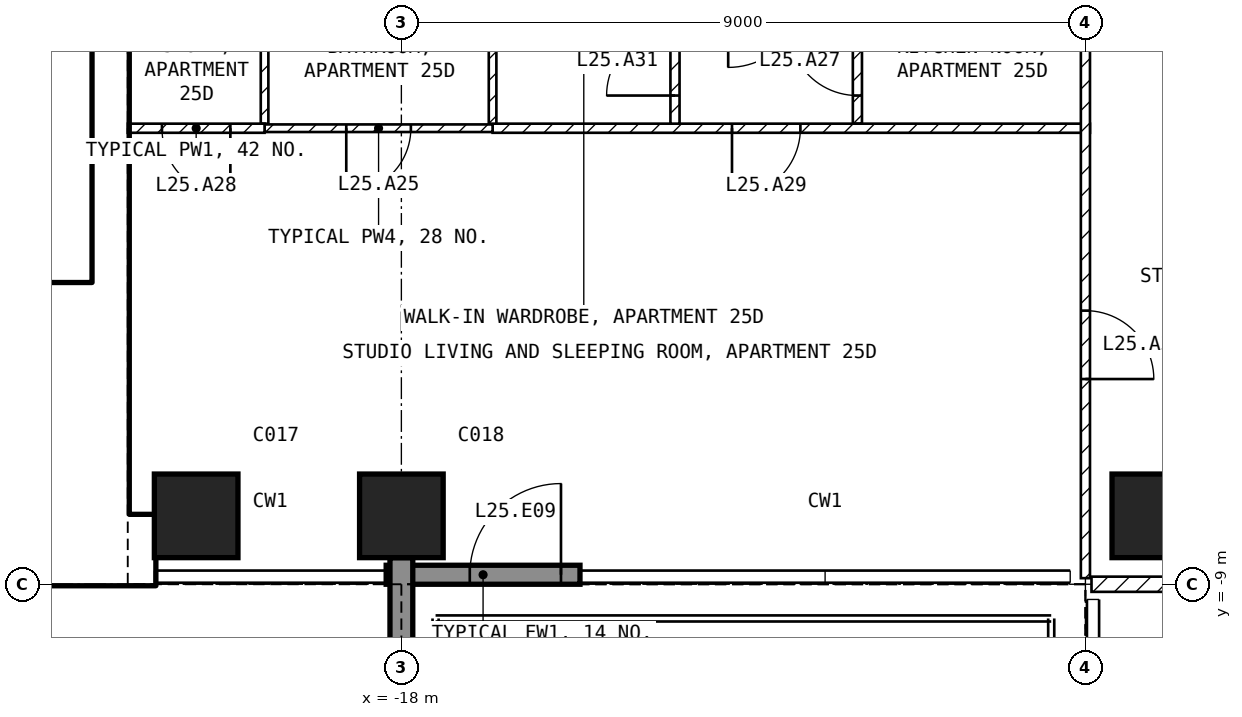
"""IFC4 building model, lengths in metres.
Left out: names, types, materials, properties, quantities, classifications, styles, units other than length and angle.
Written with IfcOpenShell. Run it as: python <this file> out.ifc"""

import sys

from ifc_helpers import new_model, si_unit, direction, frame, frame_2d, origin, origin_2d, place, context, subcontext, project, spatial, rectangle, extrude, element, fill, save


model = new_model("IFC4")
c1 = context("Model", 3, precision=1e-05, world=origin(), true_north=direction((0.0, 1.0)))
c2 = subcontext(c1, "Body", "Model", "MODEL_VIEW")
j1 = project(units=[si_unit("LENGTHUNIT", "METRE"), si_unit("PLANEANGLEUNIT", "RADIAN")], contexts=[c1])
p1 = place(None, origin())
s1 = spatial("IfcSite", under=j1, at=p1, CompositionType="ELEMENT")
p2 = place(p1, origin())
s2 = spatial("IfcBuilding", under=s1, at=p2, CompositionType="ELEMENT")
p3 = place(p2, frame((0.0, 0.0, 109.4)))
s3 = spatial("IfcBuildingStorey", under=s2, at=p3, CompositionType="ELEMENT", Elevation=109.4)
for number, where, z_axis, x_axis in (
    (1, (-20.7, -8.1, -0.25), (0.0, 0.0, 1.0), (1.0, 0.0, 0.0)),
    (2, (-18.0, -8.1, -0.25), (0.0, 0.0, 1.0), (1.0, 0.0, 0.0)),
    (3, (-8.1, -8.1, -0.25), (0.0, 0.0, 1.0), (1.0, 0.0, 0.0)),
):
    element("IfcColumn", number, at=place(p3, frame(where, z_axis=z_axis, x_axis=x_axis)), inside=s3, PredefinedType="COLUMN", context=c2, shape_type="SweptSolid", body=[
        extrude(rectangle(XDim=1.1, YDim=1.1, at=origin_2d()), origin(), (0.0, 0.0, 1.0), 3.5),
    ])
p4 = place(p3, frame((-18.2, -8.875, 0.0), z_axis=(0.0, 0.0, 1.0), x_axis=(1.0, 0.0, 0.0)))
e4 = element("IfcWall", 4, at=p4, inside=s3, PredefinedType="SOLIDWALL", context=c2, shape_type="SweptSolid", body=[
    extrude(rectangle(XDim=2.55, YDim=0.25, at=frame_2d((1.275, 0.0))), origin(), (0.0, 0.0, 1.0), 3.25),
])
p5 = place(p4, frame((1.1, 0.0, 0.0)))
e5 = element("IfcOpeningElement", 5, at=p5, cuts=e4, PredefinedType="OPENING", context=c2, shape_type="SweptSolid", body=[
    extrude(rectangle(XDim=1.2, YDim=2.4, at=frame_2d((0.6, 1.2))), frame((0.0, 0.135, 0.0), z_axis=(0.0, -1.0, 0.0), x_axis=(1.0, 0.0, 0.0)), (0.0, 0.0, 1.0), 0.27),
])
p6 = place(p3, frame((-18.0, -8.65, 0.0), z_axis=(0.0, 0.0, 1.0), x_axis=(0.0, -1.0, 0.0)))
e6 = element("IfcWall", 6, at=p6, inside=s3, PredefinedType="SOLIDWALL", context=c2, shape_type="SweptSolid", body=[
    extrude(rectangle(XDim=3.09, YDim=0.3, at=frame_2d((1.545, 0.0))), origin(), (0.0, 0.0, 1.0), 3.25),
])
p7 = place(p3, frame((-30.2, -8.55, 0.0), z_axis=(0.0, 0.0, 1.0), x_axis=(1.0, 0.0, 0.0)))
e7 = element("IfcWall", 7, at=p7, inside=s3, PredefinedType="SHEAR", context=c2, shape_type="SweptSolid", body=[
    extrude(rectangle(XDim=8.95, YDim=0.9, at=frame_2d((4.475, 0.0))), origin(), (0.0, 0.0, 1.0), 3.25),
])
p8 = place(p3, frame((-21.825, -8.1, 0.0), z_axis=(0.0, 0.0, 1.0), x_axis=(0.0, 1.0, 0.0)))
e8 = element("IfcWall", 8, at=p8, inside=s3, PredefinedType="SHEAR", context=c2, shape_type="SweptSolid", body=[
    extrude(rectangle(XDim=6.9, YDim=0.45, at=frame_2d((3.45, 0.0))), origin(), (0.0, 0.0, 1.0), 3.25),
])
p9 = place(p3, frame((-28.35, -5.15, 0.0), z_axis=(0.0, 0.0, 1.0), x_axis=(1.0, 0.0, 0.0)))
e9 = element("IfcWall", 9, at=p9, inside=s3, PredefinedType="SOLIDWALL", context=c2, shape_type="SweptSolid", body=[
    extrude(rectangle(XDim=6.3, YDim=0.2, at=frame_2d((3.15, 0.0))), origin(), (0.0, 0.0, 1.0), 3.25),
])
p10 = place(p9, frame((5.1, 0.0, 0.0)))
e10 = element("IfcOpeningElement", 10, at=p10, cuts=e9, PredefinedType="OPENING", context=c2, shape_type="SweptSolid", body=[
    extrude(rectangle(XDim=1.0, YDim=2.1, at=frame_2d((0.5, 1.05))), frame((0.0, 0.11, 0.0), z_axis=(0.0, -1.0, 0.0), x_axis=(1.0, 0.0, 0.0)), (0.0, 0.0, 1.0), 0.22),
])
p11 = place(p3, frame((8.92, -9.0, 0.0), z_axis=(0.0, 0.0, 1.0), x_axis=(-1.0, 0.0, 0.0)))
e11 = element("IfcWall", 11, at=p11, inside=s3, PredefinedType="PARTITIONING", context=c2, shape_type="SweptSolid", body=[
    extrude(rectangle(XDim=17.84, YDim=0.2, at=frame_2d((8.92, 0.0))), origin(), (0.0, 0.0, 1.0), 3.25),
])
p12 = place(p11, frame((8.42, 0.0, 0.0)))
e12 = element("IfcOpeningElement", 12, at=p12, cuts=e11, PredefinedType="OPENING", context=c2, shape_type="SweptSolid", body=[
    extrude(rectangle(XDim=1.0, YDim=2.1, at=frame_2d((0.5, 1.05))), frame((0.0, 0.11, 0.0), z_axis=(0.0, -1.0, 0.0), x_axis=(1.0, 0.0, 0.0)), (0.0, 0.0, 1.0), 0.22),
])
p13 = place(p3, frame((-12.0, -2.94, 0.0), z_axis=(0.0, 0.0, 1.0), x_axis=(0.0, 1.0, 0.0)))
e13 = element("IfcWall", 13, at=p13, inside=s3, PredefinedType="PARTITIONING", context=c2, shape_type="SweptSolid", body=[
    extrude(rectangle(XDim=1.64, YDim=0.12, at=frame_2d((0.82, 0.0))), origin(), (0.0, 0.0, 1.0), 3.25),
])
p14 = place(p13, frame((0.37, 0.0, 0.0)))
e14 = element("IfcOpeningElement", 14, at=p14, cuts=e13, PredefinedType="OPENING", context=c2, shape_type="SweptSolid", body=[
    extrude(rectangle(XDim=0.9, YDim=2.1, at=frame_2d((0.45, 1.05))), frame((0.0, 0.07, 0.0), z_axis=(0.0, -1.0, 0.0), x_axis=(1.0, 0.0, 0.0)), (0.0, 0.0, 1.0), 0.14),
])
p15 = place(p3, frame((-8.94, -3.0, 0.0), z_axis=(0.0, 0.0, 1.0), x_axis=(-1.0, 0.0, 0.0)))
e15 = element("IfcWall", 15, at=p15, inside=s3, PredefinedType="PARTITIONING", context=c2, shape_type="SweptSolid", body=[
    extrude(rectangle(XDim=7.86, YDim=0.12, at=frame_2d((3.93, 0.0))), origin(), (0.0, 0.0, 1.0), 3.25),
])
p16 = place(p15, frame((3.81, 0.0, 0.0)))
e16 = element("IfcOpeningElement", 16, at=p16, cuts=e15, PredefinedType="OPENING", context=c2, shape_type="SweptSolid", body=[
    extrude(rectangle(XDim=0.9, YDim=2.1, at=frame_2d((0.45, 1.05))), frame((0.0, 0.07, 0.0), z_axis=(0.0, -1.0, 0.0), x_axis=(1.0, 0.0, 0.0)), (0.0, 0.0, 1.0), 0.14),
])
p17 = place(p3, frame((-9.0, -1.3, 0.0), z_axis=(0.0, 0.0, 1.0), x_axis=(0.0, -1.0, 0.0)))
e17 = element("IfcWall", 17, at=p17, inside=s3, PredefinedType="PARTITIONING", context=c2, shape_type="SweptSolid", body=[
    extrude(rectangle(XDim=7.62, YDim=0.12, at=frame_2d((3.81, 0.0))), origin(), (0.0, 0.0, 1.0), 3.25),
])
p18 = place(p17, frame((4.1, 0.0, 0.0)))
e18 = element("IfcOpeningElement", 18, at=p18, cuts=e17, PredefinedType="OPENING", context=c2, shape_type="SweptSolid", body=[
    extrude(rectangle(XDim=0.9, YDim=2.1, at=frame_2d((0.45, 1.05))), frame((0.0, 0.07, 0.0), z_axis=(0.0, -1.0, 0.0), x_axis=(1.0, 0.0, 0.0)), (0.0, 0.0, 1.0), 0.14),
])
p19 = place(p3, frame((-14.4, -2.94, 0.0), z_axis=(0.0, 0.0, 1.0), x_axis=(0.0, 1.0, 0.0)))
e19 = element("IfcWall", 19, at=p19, inside=s3, PredefinedType="PARTITIONING", context=c2, shape_type="SweptSolid", body=[
    extrude(rectangle(XDim=1.64, YDim=0.12, at=frame_2d((0.82, 0.0))), origin(), (0.0, 0.0, 1.0), 3.25),
])
p20 = place(p19, frame((0.37, 0.0, 0.0)))
e20 = element("IfcOpeningElement", 20, at=p20, cuts=e19, PredefinedType="OPENING", context=c2, shape_type="SweptSolid", body=[
    extrude(rectangle(XDim=0.9, YDim=2.1, at=frame_2d((0.45, 1.05))), frame((0.0, 0.07, 0.0), z_axis=(0.0, -1.0, 0.0), x_axis=(1.0, 0.0, 0.0)), (0.0, 0.0, 1.0), 0.14),
])
for number, where, z_axis, x_axis in (
    (21, (-16.8, -2.94, 0.0), (0.0, 0.0, 1.0), (0.0, 1.0, 0.0)),
    (22, (-19.8, -2.94, 0.0), (0.0, 0.0, 1.0), (0.0, 1.0, 0.0)),
):
    element("IfcWall", number, at=place(p3, frame(where, z_axis=z_axis, x_axis=x_axis)), inside=s3, PredefinedType="PARTITIONING", context=c2, shape_type="SweptSolid", body=[
        extrude(rectangle(XDim=1.64, YDim=0.1, at=frame_2d((0.82, 0.0))), origin(), (0.0, 0.0, 1.0), 3.25),
    ])
p21 = place(p3, frame((-16.8, -3.0, 0.0), z_axis=(0.0, 0.0, 1.0), x_axis=(-1.0, 0.0, 0.0)))
e23 = element("IfcWall", 23, at=p21, inside=s3, PredefinedType="PARTITIONING", context=c2, shape_type="SweptSolid", body=[
    extrude(rectangle(XDim=3.0, YDim=0.1, at=frame_2d((1.5, 0.0))), origin(), (0.0, 0.0, 1.0), 3.25),
])
p22 = place(p21, frame((1.075, 0.0, 0.0)))
e24 = element("IfcOpeningElement", 24, at=p22, cuts=e23, PredefinedType="OPENING", context=c2, shape_type="SweptSolid", body=[
    extrude(rectangle(XDim=0.85, YDim=2.1, at=frame_2d((0.425, 1.05))), frame((0.0, 0.06, 0.0), z_axis=(0.0, -1.0, 0.0), x_axis=(1.0, 0.0, 0.0)), (0.0, 0.0, 1.0), 0.12),
])
p23 = place(p3, frame((-19.8, -3.0, 0.0), z_axis=(0.0, 0.0, 1.0), x_axis=(-1.0, 0.0, 0.0)))
e25 = element("IfcWall", 25, at=p23, inside=s3, PredefinedType="PARTITIONING", context=c2, shape_type="SweptSolid", body=[
    extrude(rectangle(XDim=1.8, YDim=0.12, at=frame_2d((0.9, 0.0))), origin(), (0.0, 0.0, 1.0), 3.25),
])
p24 = place(p23, frame((0.45, 0.0, 0.0)))
e26 = element("IfcOpeningElement", 26, at=p24, cuts=e25, PredefinedType="OPENING", context=c2, shape_type="SweptSolid", body=[
    extrude(rectangle(XDim=0.9, YDim=2.1, at=frame_2d((0.45, 1.05))), frame((0.0, 0.07, 0.0), z_axis=(0.0, -1.0, 0.0), x_axis=(1.0, 0.0, 0.0)), (0.0, 0.0, 1.0), 0.14),
])
p25 = place(p5, origin())
e27 = element("IfcDoor", 27, at=p25, inside=s3, OperationType="SINGLE_SWING_RIGHT", PredefinedType="DOOR", context=c2, shape_type="SweptSolid", body=[
    extrude(rectangle(XDim=1.2, YDim=2.4, at=frame_2d((0.6, 1.2))), frame((0.0, 0.025, 0.0), z_axis=(0.0, -1.0, 0.0), x_axis=(1.0, 0.0, 0.0)), (0.0, 0.0, 1.0), 0.05),
])
fill(e5, e27)
p26 = place(p10, origin())
e28 = element("IfcDoor", 28, at=p26, inside=s3, OperationType="SINGLE_SWING_LEFT", PredefinedType="DOOR", context=c2, shape_type="SweptSolid", body=[
    extrude(rectangle(XDim=1.0, YDim=2.1, at=frame_2d((0.5, 1.05))), frame((0.0, 0.025, 0.0), z_axis=(0.0, -1.0, 0.0), x_axis=(1.0, 0.0, 0.0)), (0.0, 0.0, 1.0), 0.05),
])
fill(e10, e28)
p27 = place(p22, origin())
e29 = element("IfcDoor", 29, at=p27, inside=s3, OperationType="SINGLE_SWING_RIGHT", PredefinedType="DOOR", context=c2, shape_type="SweptSolid", body=[
    extrude(rectangle(XDim=0.85, YDim=2.1, at=frame_2d((0.425, 1.05))), frame((0.0, 0.025, 0.0), z_axis=(0.0, -1.0, 0.0), x_axis=(1.0, 0.0, 0.0)), (0.0, 0.0, 1.0), 0.05),
])
fill(e24, e29)
p28 = place(p14, origin())
e30 = element("IfcDoor", 30, at=p28, inside=s3, OperationType="SINGLE_SWING_RIGHT", PredefinedType="DOOR", context=c2, shape_type="SweptSolid", body=[
    extrude(rectangle(XDim=0.9, YDim=2.1, at=frame_2d((0.45, 1.05))), frame((0.0, 0.025, 0.0), z_axis=(0.0, -1.0, 0.0), x_axis=(1.0, 0.0, 0.0)), (0.0, 0.0, 1.0), 0.05),
])
fill(e14, e30)
p29 = place(p24, origin())
e31 = element("IfcDoor", 31, at=p29, inside=s3, OperationType="SINGLE_SWING_LEFT", PredefinedType="DOOR", context=c2, shape_type="SweptSolid", body=[
    extrude(rectangle(XDim=0.9, YDim=2.1, at=frame_2d((0.45, 1.05))), frame((0.0, 0.025, 0.0), z_axis=(0.0, -1.0, 0.0), x_axis=(1.0, 0.0, 0.0)), (0.0, 0.0, 1.0), 0.05),
])
fill(e26, e31)
p30 = place(p16, origin())
e32 = element("IfcDoor", 32, at=p30, inside=s3, OperationType="SINGLE_SWING_RIGHT", PredefinedType="DOOR", context=c2, shape_type="SweptSolid", body=[
    extrude(rectangle(XDim=0.9, YDim=2.1, at=frame_2d((0.45, 1.05))), frame((0.0, 0.025, 0.0), z_axis=(0.0, -1.0, 0.0), x_axis=(1.0, 0.0, 0.0)), (0.0, 0.0, 1.0), 0.05),
])
fill(e16, e32)
p31 = place(p18, origin())
e33 = element("IfcDoor", 33, at=p31, inside=s3, OperationType="SINGLE_SWING_RIGHT", PredefinedType="DOOR", context=c2, shape_type="SweptSolid", body=[
    extrude(rectangle(XDim=0.9, YDim=2.1, at=frame_2d((0.45, 1.05))), frame((0.0, 0.025, 0.0), z_axis=(0.0, -1.0, 0.0), x_axis=(1.0, 0.0, 0.0)), (0.0, 0.0, 1.0), 0.05),
])
fill(e18, e33)
p32 = place(p20, origin())
e34 = element("IfcDoor", 34, at=p32, inside=s3, OperationType="SINGLE_SWING_LEFT", PredefinedType="DOOR", context=c2, shape_type="SweptSolid", body=[
    extrude(rectangle(XDim=0.9, YDim=2.1, at=frame_2d((0.45, 1.05))), frame((0.0, 0.025, 0.0), z_axis=(0.0, -1.0, 0.0), x_axis=(1.0, 0.0, 0.0)), (0.0, 0.0, 1.0), 0.05),
])
fill(e20, e34)
save(model, sys.argv[1])
